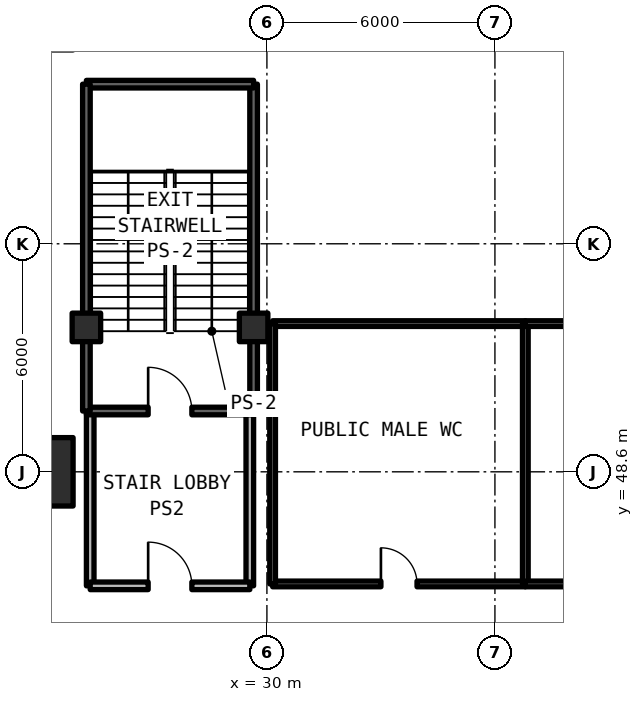
"""IFC4 building model, lengths in metres.
Left out: names, types, materials, properties, quantities, classifications, styles, units other than length and angle.
Written with IfcOpenShell. Run it as: python <this file> out.ifc"""

import sys

from ifc_helpers import new_model, si_unit, direction, frame, frame_2d, origin, origin_2d, place, context, subcontext, project, spatial, rectangle, extrude, element, fill, save


model = new_model("IFC4")
c1 = context("Model", 3, precision=1e-05, world=origin(), true_north=direction((0.0, 1.0)))
c2 = subcontext(c1, "Body", "Model", "MODEL_VIEW")
j1 = project(units=[si_unit("LENGTHUNIT", "METRE"), si_unit("PLANEANGLEUNIT", "RADIAN")], contexts=[c1])
p1 = place(None, origin())
s1 = spatial("IfcSite", under=j1, at=p1, CompositionType="ELEMENT")
p2 = place(p1, origin())
s2 = spatial("IfcBuilding", under=s1, at=p2, CompositionType="ELEMENT")
p3 = place(p2, origin())
s3 = spatial("IfcBuildingStorey", under=s2, at=p3, CompositionType="ELEMENT", Elevation=0.0)
p4 = place(p3, frame((24.0, 48.6, 0.0), z_axis=(0.0, 0.0, 1.0), x_axis=(1.0, 0.0, 0.0)))
e1 = element("IfcColumn", 1, at=p4, inside=s3, PredefinedType="COLUMN", context=c2, shape_type="SweptSolid", body=[
    extrude(rectangle(XDim=1.8, YDim=1.8, at=origin_2d()), origin(), (0.0, 0.0, 1.0), 4.95),
])
for number, where, z_axis, x_axis in (
    (2, (25.25, 52.4, 0.0), (0.0, 0.0, 1.0), (1.0, 0.0, 0.0)),
    (3, (29.65, 52.4, 0.0), (0.0, 0.0, 1.0), (1.0, 0.0, 0.0)),
):
    element("IfcColumn", number, at=place(p3, frame(where, z_axis=z_axis, x_axis=x_axis)), inside=s3, PredefinedType="COLUMN", context=c2, shape_type="SweptSolid", body=[
        extrude(rectangle(XDim=0.75, YDim=0.75, at=origin_2d()), origin(), (0.0, 0.0, 1.0), 4.95),
    ])
for number, where, z_axis, x_axis in (
    (4, (25.35, 45.6, 0.0), (0.0, 0.0, 1.0), (0.0, 1.0, 0.0)),
    (5, (29.55, 45.6, 0.0), (0.0, 0.0, 1.0), (0.0, 1.0, 0.0)),
):
    element("IfcWall", number, at=place(p3, frame(where, z_axis=z_axis, x_axis=x_axis)), inside=s3, PredefinedType="SOLIDWALL", context=c2, shape_type="SweptSolid", body=[
        extrude(rectangle(XDim=4.6, YDim=0.2, at=frame_2d((2.3, 0.0))), origin(), (0.0, 0.0, 1.0), 3.89),
    ])
p5 = place(p3, frame((25.35, 45.6, 0.0), z_axis=(0.0, 0.0, 1.0), x_axis=(1.0, 0.0, 0.0)))
e6 = element("IfcWall", 6, at=p5, inside=s3, PredefinedType="SOLIDWALL", context=c2, shape_type="SweptSolid", body=[
    extrude(rectangle(XDim=4.2, YDim=0.2, at=frame_2d((2.1, 0.0))), origin(), (0.0, 0.0, 1.0), 3.89),
])
p6 = place(p5, frame((1.525, 0.0, 0.0)))
e7 = element("IfcOpeningElement", 7, at=p6, cuts=e6, PredefinedType="OPENING", context=c2, shape_type="SweptSolid", body=[
    extrude(rectangle(XDim=1.15, YDim=2.15, at=frame_2d((0.575, 1.075))), frame((0.0, 0.11, 0.0), z_axis=(0.0, -1.0, 0.0), x_axis=(1.0, 0.0, 0.0)), (0.0, 0.0, 1.0), 0.22),
])
p7 = place(p3, frame((30.15, 45.65, 0.0), z_axis=(0.0, 0.0, 1.0), x_axis=(1.0, 0.0, 0.0)))
e8 = element("IfcWall", 8, at=p7, inside=s3, PredefinedType="SOLIDWALL", context=c2, shape_type="SweptSolid", body=[
    extrude(rectangle(XDim=6.65, YDim=0.15, at=frame_2d((3.325, 0.0))), origin(), (0.0, 0.0, 1.0), 3.89),
])
p8 = place(p7, frame((2.85, 0.0, 0.0)))
e9 = element("IfcOpeningElement", 9, at=p8, cuts=e8, PredefinedType="OPENING", context=c2, shape_type="SweptSolid", body=[
    extrude(rectangle(XDim=0.95, YDim=2.15, at=frame_2d((0.475, 1.075))), frame((0.0, 0.085, 0.0), z_axis=(0.0, -1.0, 0.0), x_axis=(1.0, 0.0, 0.0)), (0.0, 0.0, 1.0), 0.17),
])
p9 = place(p3, frame((30.15, 52.5, 0.0), z_axis=(0.0, 0.0, 1.0), x_axis=(1.0, 0.0, 0.0)))
e10 = element("IfcWall", 10, at=p9, inside=s3, PredefinedType="SOLIDWALL", context=c2, shape_type="SweptSolid", body=[
    extrude(rectangle(XDim=6.65, YDim=0.15, at=frame_2d((3.325, 0.0))), origin(), (0.0, 0.0, 1.0), 3.89),
])
for number, where, z_axis, x_axis in (
    (11, (30.15, 45.65, 0.0), (0.0, 0.0, 1.0), (0.0, 1.0, 0.0)),
    (12, (36.8, 45.65, 0.0), (0.0, 0.0, 1.0), (0.0, 1.0, 0.0)),
):
    element("IfcWall", number, at=place(p3, frame(where, z_axis=z_axis, x_axis=x_axis)), inside=s3, PredefinedType="SOLIDWALL", context=c2, shape_type="SweptSolid", body=[
        extrude(rectangle(XDim=6.85, YDim=0.15, at=frame_2d((3.425, 0.0))), origin(), (0.0, 0.0, 1.0), 3.89),
    ])
p10 = place(p3, frame((36.8, 45.65, 0.0), z_axis=(0.0, 0.0, 1.0), x_axis=(1.0, 0.0, 0.0)))
e13 = element("IfcWall", 13, at=p10, inside=s3, PredefinedType="SOLIDWALL", context=c2, shape_type="SweptSolid", body=[
    extrude(rectangle(XDim=7.4, YDim=0.15, at=frame_2d((3.7, 0.0))), origin(), (0.0, 0.0, 1.0), 3.89),
])
p11 = place(p10, frame((3.225, 0.0, 0.0)))
e14 = element("IfcOpeningElement", 14, at=p11, cuts=e13, PredefinedType="OPENING", context=c2, shape_type="SweptSolid", body=[
    extrude(rectangle(XDim=0.95, YDim=2.15, at=frame_2d((0.475, 1.075))), frame((0.0, 0.085, 0.0), z_axis=(0.0, -1.0, 0.0), x_axis=(1.0, 0.0, 0.0)), (0.0, 0.0, 1.0), 0.17),
])
p12 = place(p3, frame((36.8, 52.5, 0.0), z_axis=(0.0, 0.0, 1.0), x_axis=(1.0, 0.0, 0.0)))
e15 = element("IfcWall", 15, at=p12, inside=s3, PredefinedType="SOLIDWALL", context=c2, shape_type="SweptSolid", body=[
    extrude(rectangle(XDim=7.4, YDim=0.15, at=frame_2d((3.7, 0.0))), origin(), (0.0, 0.0, 1.0), 3.89),
])
p13 = place(p3, frame((25.25, 50.2, 0.0), z_axis=(0.0, 0.0, 1.0), x_axis=(1.0, 0.0, 0.0)))
e16 = element("IfcWall", 16, at=p13, inside=s3, PredefinedType="SOLIDWALL", context=c2, shape_type="SweptSolid", body=[
    extrude(rectangle(XDim=4.4, YDim=0.2, at=frame_2d((2.2, 0.0))), origin(), (0.0, 0.0, 1.0), 4.95),
])
p14 = place(p13, frame((1.625, 0.0, 0.0)))
e17 = element("IfcOpeningElement", 17, at=p14, cuts=e16, PredefinedType="OPENING", context=c2, shape_type="SweptSolid", body=[
    extrude(rectangle(XDim=1.15, YDim=2.15, at=frame_2d((0.575, 1.075))), frame((0.0, 0.11, 0.0), z_axis=(0.0, -1.0, 0.0), x_axis=(1.0, 0.0, 0.0)), (0.0, 0.0, 1.0), 0.22),
])
p15 = place(p3, frame((29.65, 50.2, 0.0), z_axis=(0.0, 0.0, 1.0), x_axis=(0.0, 1.0, 0.0)))
e18 = element("IfcWall", 18, at=p15, inside=s3, PredefinedType="SOLIDWALL", context=c2, shape_type="SweptSolid", body=[
    extrude(rectangle(XDim=8.6, YDim=0.2, at=frame_2d((4.3, 0.0))), origin(), (0.0, 0.0, 1.0), 4.95),
])
p16 = place(p3, frame((29.65, 58.8, 0.0), z_axis=(0.0, 0.0, 1.0), x_axis=(-1.0, 0.0, 0.0)))
e19 = element("IfcWall", 19, at=p16, inside=s3, PredefinedType="SOLIDWALL", context=c2, shape_type="SweptSolid", body=[
    extrude(rectangle(XDim=4.4, YDim=0.2, at=frame_2d((2.2, 0.0))), origin(), (0.0, 0.0, 1.0), 4.95),
])
p17 = place(p3, frame((25.25, 58.8, 0.0), z_axis=(0.0, 0.0, 1.0), x_axis=(0.0, -1.0, 0.0)))
e20 = element("IfcWall", 20, at=p17, inside=s3, PredefinedType="SOLIDWALL", context=c2, shape_type="SweptSolid", body=[
    extrude(rectangle(XDim=8.6, YDim=0.2, at=frame_2d((4.3, 0.0))), origin(), (0.0, 0.0, 1.0), 4.95),
])
p18 = place(p6, frame((1.15, 0.0, 0.0), z_axis=(0.0, 0.0, 1.0), x_axis=(-1.0, 0.0, 0.0)))
e21 = element("IfcDoor", 21, at=p18, inside=s3, OperationType="SINGLE_SWING_LEFT", PredefinedType="DOOR", context=c2, shape_type="SweptSolid", body=[
    extrude(rectangle(XDim=1.15, YDim=2.15, at=frame_2d((0.575, 1.075))), frame((0.0, 0.025, 0.0), z_axis=(0.0, -1.0, 0.0), x_axis=(1.0, 0.0, 0.0)), (0.0, 0.0, 1.0), 0.05),
])
fill(e7, e21)
p19 = place(p8, frame((0.95, 0.0, 0.0), z_axis=(0.0, 0.0, 1.0), x_axis=(-1.0, 0.0, 0.0)))
e22 = element("IfcDoor", 22, at=p19, inside=s3, OperationType="SINGLE_SWING_LEFT", PredefinedType="DOOR", context=c2, shape_type="SweptSolid", body=[
    extrude(rectangle(XDim=0.95, YDim=2.15, at=frame_2d((0.475, 1.075))), frame((0.0, 0.025, 0.0), z_axis=(0.0, -1.0, 0.0), x_axis=(1.0, 0.0, 0.0)), (0.0, 0.0, 1.0), 0.05),
])
fill(e9, e22)
p20 = place(p14, frame((1.15, 0.0, 0.0), z_axis=(0.0, 0.0, 1.0), x_axis=(-1.0, 0.0, 0.0)))
e23 = element("IfcDoor", 23, at=p20, inside=s3, OperationType="SINGLE_SWING_RIGHT", PredefinedType="DOOR", context=c2, shape_type="SweptSolid", body=[
    extrude(rectangle(XDim=1.15, YDim=2.15, at=frame_2d((0.575, 1.075))), frame((0.0, 0.025, 0.0), z_axis=(0.0, -1.0, 0.0), x_axis=(1.0, 0.0, 0.0)), (0.0, 0.0, 1.0), 0.05),
])
fill(e17, e23)
save(model, sys.argv[1])
